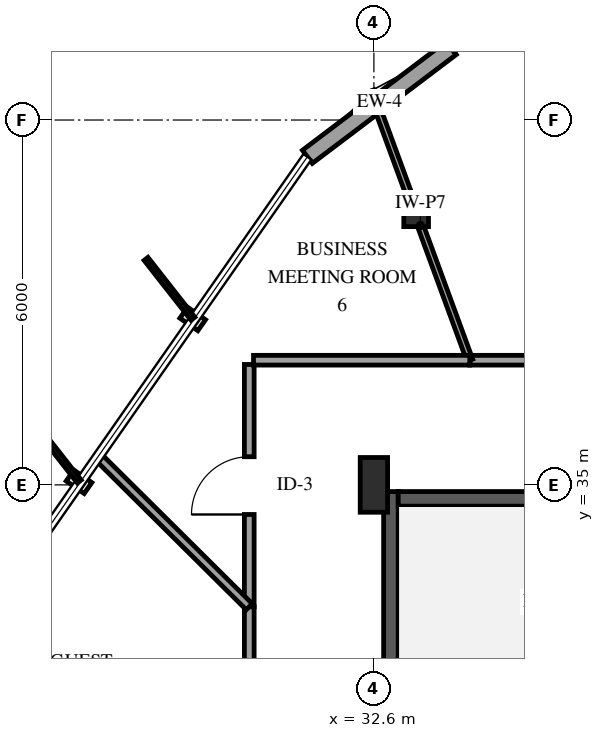
"""IFC4 building model, lengths in metres.
Left out: names, types, materials, properties, quantities, classifications, styles, units other than length and angle.
Written with IfcOpenShell. Run it as: python <this file> out.ifc"""

import sys

from ifc_helpers import new_model, si_unit, direction, frame, frame_2d, origin, origin_2d, place, context, subcontext, project, spatial, rectangle, i_section, extrude, element, fill, save


model = new_model("IFC4")
c1 = context("Model", 3, precision=1e-05, world=origin(), true_north=direction((0.0, 1.0)))
c2 = subcontext(c1, "Body", "Model", "MODEL_VIEW")
j1 = project(units=[si_unit("LENGTHUNIT", "METRE"), si_unit("PLANEANGLEUNIT", "RADIAN")], contexts=[c1])
p1 = place(None, origin())
s1 = spatial("IfcSite", under=j1, at=p1, CompositionType="ELEMENT")
p2 = place(p1, origin())
s2 = spatial("IfcBuilding", under=s1, at=p2, CompositionType="ELEMENT")
p3 = place(p2, frame((0.0, 0.0, 233.8)))
s3 = spatial("IfcBuildingStorey", under=s2, at=p3, CompositionType="ELEMENT", Elevation=233.8)
p4 = place(p3, frame((32.88, 31.26, 0.0), z_axis=(0.0, 0.0, 1.0), x_axis=(0.0, 1.0, 0.0)))
e1 = element("IfcWall", 1, at=p4, inside=s3, PredefinedType="SHEAR", context=c2, shape_type="SweptSolid", body=[
    extrude(rectangle(XDim=3.63, YDim=0.24, at=frame_2d((1.815, 0.0))), origin(), (0.0, 0.0, 1.0), 3.6),
])
p5 = place(p3, frame((33.0, 34.77, 0.0), z_axis=(0.0, 0.0, 1.0), x_axis=(1.0, 0.0, 0.0)))
e2 = element("IfcWall", 2, at=p5, inside=s3, PredefinedType="SHEAR", context=c2, shape_type="SweptSolid", body=[
    extrude(rectangle(XDim=8.0, YDim=0.24, at=frame_2d((4.0, 0.0))), origin(), (0.0, 0.0, 1.0), 3.6),
])
p6 = place(p3, frame((32.6, 35.0, 0.0), z_axis=(0.0, 0.0, 1.0), x_axis=(1.0, 0.0, 0.0)))
e3 = element("IfcColumn", 3, at=p6, inside=s3, PredefinedType="PILASTER", context=c2, shape_type="SweptSolid", body=[
    extrude(rectangle(XDim=0.45, YDim=0.9, at=origin_2d()), origin(), (0.0, 0.0, 1.0), 3.6),
])
p7 = place(p3, frame((33.295, 39.455, 0.0), z_axis=(0.0, 0.0, 1.0), x_axis=(1.0, 0.0, 0.0)))
e4 = element("IfcColumn", 4, at=p7, inside=s3, PredefinedType="COLUMN", context=c2, shape_type="SweptSolid", body=[
    extrude(i_section(OverallWidth=0.406, OverallDepth=0.416, WebThickness=0.03, FlangeThickness=0.048, FilletRadius=0.038, at=origin_2d()), origin(), (0.0, 0.0, 1.0), 3.6),
])
p8 = place(p3, frame((33.873, 42.184, 0.0), z_axis=(0.0, 0.0, 1.0), x_axis=(-0.797802225535, -0.602919239145, 0.0)))
e5 = element("IfcWall", 5, at=p8, inside=s3, PredefinedType="SOLIDWALL", context=c2, shape_type="SweptSolid", body=[
    extrude(rectangle(XDim=2.967, YDim=0.27, at=frame_2d((1.483, 0.0))), origin(), (0.0, 0.0, 1.0), 2.599),
])
p9 = place(p3, frame((34.177, 37.05, 0.0), z_axis=(0.0, 0.0, 1.0), x_axis=(1.0, 0.0, 0.0)))
e6 = element("IfcWall", 6, at=p9, inside=s3, PredefinedType="PARTITIONING", context=c2, shape_type="SweptSolid", body=[
    extrude(rectangle(XDim=6.953, YDim=0.16, at=frame_2d((3.477, 0.0))), origin(), (0.0, 0.0, 1.0), 3.26),
])
p10 = place(p3, frame((34.177, 37.05, 0.0), z_axis=(0.0, 0.0, 1.0), x_axis=(-0.344450796519, 0.938804371942, 0.0)))
e7 = element("IfcWall", 7, at=p10, inside=s3, PredefinedType="PARTITIONING", context=c2, shape_type="SweptSolid", body=[
    extrude(rectangle(XDim=4.718, YDim=0.1, at=frame_2d((2.359, 0.0))), origin(), (0.0, 0.0, 1.0), 2.515),
])
p11 = place(p3, frame((30.55, 28.351, 0.0), z_axis=(0.0, 0.0, 1.0), x_axis=(0.0, 1.0, 0.0)))
e8 = element("IfcWall", 8, at=p11, inside=s3, PredefinedType="PARTITIONING", context=c2, shape_type="SweptSolid", body=[
    extrude(rectangle(XDim=4.645, YDim=0.16, at=frame_2d((2.323, 0.0))), origin(), (0.0, 0.0, 1.0), 3.26),
])
p12 = place(p11, frame((1.848, 0.0, 0.0)))
e9 = element("IfcOpeningElement", 9, at=p12, cuts=e8, PredefinedType="OPENING", context=c2, shape_type="SweptSolid", body=[
    extrude(rectangle(XDim=0.95, YDim=2.15, at=frame_2d((0.475, 1.075))), frame((0.0, 0.09, 0.0), z_axis=(0.0, -1.0, 0.0), x_axis=(1.0, 0.0, 0.0)), (0.0, 0.0, 1.0), 0.18),
])
p13 = place(p3, frame((30.55, 32.996, 0.0), z_axis=(0.0, 0.0, 1.0), x_axis=(0.0, 1.0, 0.0)))
e10 = element("IfcWall", 10, at=p13, inside=s3, PredefinedType="PARTITIONING", context=c2, shape_type="SweptSolid", body=[
    extrude(rectangle(XDim=3.984, YDim=0.16, at=frame_2d((1.992, 0.0))), origin(), (0.0, 0.0, 1.0), 3.26),
])
p14 = place(p13, frame((1.517, 0.0, 0.0)))
e11 = element("IfcOpeningElement", 11, at=p14, cuts=e10, PredefinedType="OPENING", context=c2, shape_type="SweptSolid", body=[
    extrude(rectangle(XDim=0.95, YDim=2.15, at=frame_2d((0.475, 1.075))), frame((0.0, 0.09, 0.0), z_axis=(0.0, -1.0, 0.0), x_axis=(1.0, 0.0, 0.0)), (0.0, 0.0, 1.0), 0.18),
])
p15 = place(p3, frame((30.62, 37.05, 0.0), z_axis=(0.0, 0.0, 1.0), x_axis=(1.0, 0.0, 0.0)))
e12 = element("IfcWall", 12, at=p15, inside=s3, PredefinedType="PARTITIONING", context=c2, shape_type="SweptSolid", body=[
    extrude(rectangle(XDim=3.557, YDim=0.16, at=frame_2d((1.778, 0.0))), origin(), (0.0, 0.0, 1.0), 3.26),
])
p16 = place(p3, frame((30.55, 32.996, 0.0), z_axis=(0.0, 0.0, 1.0), x_axis=(-0.709819036823, 0.704384081992, 0.0)))
e13 = element("IfcWall", 13, at=p16, inside=s3, PredefinedType="PARTITIONING", context=c2, shape_type="SweptSolid", body=[
    extrude(rectangle(XDim=3.504, YDim=0.14, at=frame_2d((1.752, 0.0))), origin(), (0.0, 0.0, 1.0), 3.26),
])
p17 = place(p14, origin())
e14 = element("IfcDoor", 14, at=p17, inside=s3, OperationType="SINGLE_SWING_LEFT", PredefinedType="DOOR", context=c2, shape_type="SweptSolid", body=[
    extrude(rectangle(XDim=0.95, YDim=2.15, at=frame_2d((0.475, 1.075))), frame((0.0, 0.025, 0.0), z_axis=(0.0, -1.0, 0.0), x_axis=(1.0, 0.0, 0.0)), (0.0, 0.0, 1.0), 0.05),
])
fill(e11, e14)
save(model, sys.argv[1])
